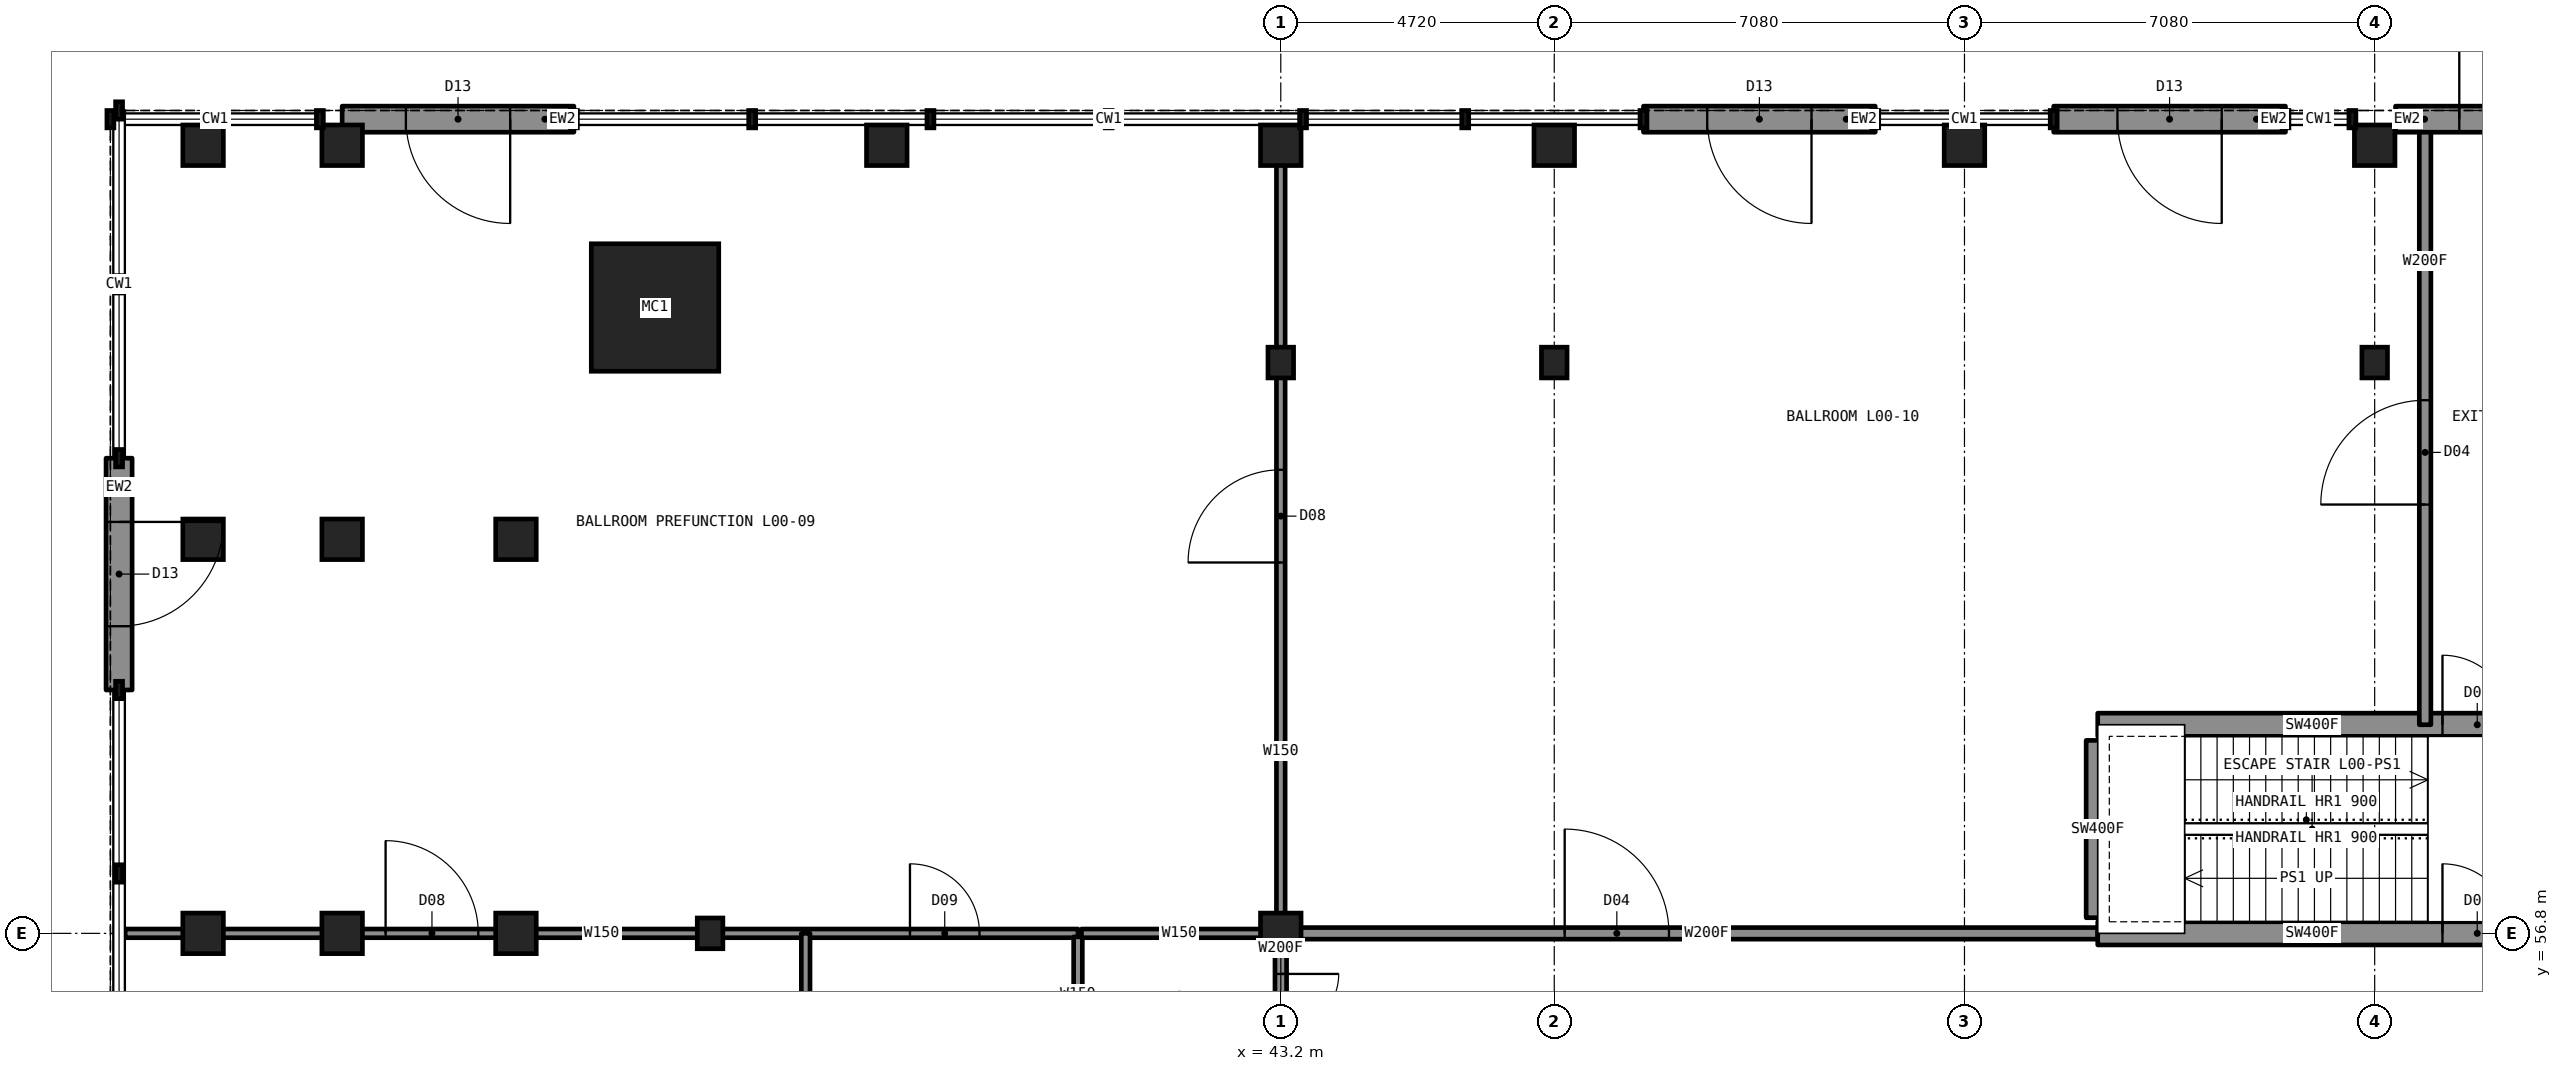
"""IFC4 building model, lengths in metres.
Left out: names, types, materials, properties, quantities, classifications, styles, units other than length and angle.
Written with IfcOpenShell. Run it as: python <this file> out.ifc"""

import sys

from ifc_helpers import new_model, si_unit, direction, frame, frame_2d, origin, origin_2d, place, context, subcontext, project, spatial, rectangle, hollow_rectangle, i_section, extrude, element, fill, save


model = new_model("IFC4")
c1 = context("Model", 3, precision=1e-05, world=origin(), true_north=direction((0.0, 1.0)))
c2 = subcontext(c1, "Body", "Model", "MODEL_VIEW")
j1 = project(units=[si_unit("LENGTHUNIT", "METRE"), si_unit("PLANEANGLEUNIT", "RADIAN")], contexts=[c1])
p1 = place(None, origin())
s1 = spatial("IfcSite", under=j1, at=p1, CompositionType="ELEMENT")
p2 = place(p1, origin())
s2 = spatial("IfcBuilding", under=s1, at=p2, CompositionType="ELEMENT")
p3 = place(p2, origin())
s3 = spatial("IfcBuildingStorey", under=s2, at=p3, CompositionType="ELEMENT", Elevation=0.0)
for number, where, z_axis, x_axis in (
    (1, (33.35, 56.8, 0.0), (0.0, 0.0, 1.0), (1.0, 0.0, 0.0)),
    (2, (43.2, 66.65, 0.0), (0.0, 0.0, 1.0), (1.0, 0.0, 0.0)),
    (3, (47.92, 66.65, 0.0), (0.0, 0.0, 1.0), (1.0, 0.0, 0.0)),
    (4, (62.08, 66.65, 0.0), (0.0, 0.0, 1.0), (1.0, 0.0, 0.0)),
):
    element("IfcColumn", number, at=place(p3, frame(where, z_axis=z_axis, x_axis=x_axis)), inside=s3, PredefinedType="COLUMN", context=c2, shape_type="SweptSolid", body=[
        extrude(i_section(OverallWidth=0.442, OverallDepth=0.531, WebThickness=0.066, FlangeThickness=0.106, at=origin_2d()), origin(), (0.0, 0.0, 1.0), 5.6),
    ])
p4 = place(p3, frame((43.2, 56.8, 0.0), z_axis=(0.0, 0.0, 1.0), x_axis=(1.0, 0.0, 0.0)))
e5 = element("IfcColumn", 5, at=p4, inside=s3, PredefinedType="COLUMN", context=c2, shape_type="SweptSolid", body=[
    extrude(hollow_rectangle(XDim=0.7, YDim=0.7, WallThickness=0.06, at=origin_2d()), origin(), (0.0, 0.0, 1.0), 5.6),
])
p5 = place(p3, frame((32.4, 67.6, 0.0), z_axis=(0.0, 0.0, 1.0), x_axis=(1.0, 0.0, 0.0)))
e6 = element("IfcColumn", 6, at=p5, inside=s3, PredefinedType="COLUMN", context=c2, shape_type="SweptSolid", body=[
    extrude(hollow_rectangle(XDim=2.2, YDim=2.2, WallThickness=0.15, at=origin_2d()), origin(), (0.0, 0.0, 1.0), 5.6),
])
for number, where, z_axis, x_axis in (
    (7, (24.6, 56.8, 0.0), (0.0, 0.0, 1.0), (1.0, 0.0, 0.0)),
    (8, (24.6, 63.6, 0.0), (0.0, 0.0, 1.0), (1.0, 0.0, 0.0)),
    (9, (24.6, 70.4, 0.0), (0.0, 0.0, 1.0), (1.0, 0.0, 0.0)),
    (10, (27.0, 56.8, 0.0), (0.0, 0.0, 1.0), (1.0, 0.0, 0.0)),
    (11, (27.0, 63.6, 0.0), (0.0, 0.0, 1.0), (1.0, 0.0, 0.0)),
    (12, (27.0, 70.4, 0.0), (0.0, 0.0, 1.0), (1.0, 0.0, 0.0)),
    (13, (30.0, 56.8, 0.0), (0.0, 0.0, 1.0), (1.0, 0.0, 0.0)),
    (14, (30.0, 63.6, 0.0), (0.0, 0.0, 1.0), (1.0, 0.0, 0.0)),
    (15, (36.4, 70.4, 0.0), (0.0, 0.0, 1.0), (1.0, 0.0, 0.0)),
    (16, (43.2, 70.4, 0.0), (0.0, 0.0, 1.0), (1.0, 0.0, 0.0)),
    (17, (47.92, 70.4, 0.0), (0.0, 0.0, 1.0), (1.0, 0.0, 0.0)),
    (18, (55.0, 70.4, 0.0), (0.0, 0.0, 1.0), (1.0, 0.0, 0.0)),
    (19, (62.08, 70.4, 0.0), (0.0, 0.0, 1.0), (1.0, 0.0, 0.0)),
):
    element("IfcColumn", number, at=place(p3, frame(where, z_axis=z_axis, x_axis=x_axis)), inside=s3, PredefinedType="COLUMN", context=c2, shape_type="SweptSolid", body=[
        extrude(rectangle(XDim=0.7, YDim=0.7, at=origin_2d()), origin(), (0.0, 0.0, 1.0), 5.6),
    ])
p6 = place(p3, frame((43.2, 56.8, 0.0), z_axis=(0.0, 0.0, 1.0), x_axis=(1.0, 0.0, 0.0)))
e20 = element("IfcWall", 20, at=p6, inside=s3, PredefinedType="PARTITIONING", context=c2, shape_type="SweptSolid", body=[
    extrude(rectangle(XDim=14.1, YDim=0.2, at=frame_2d((7.05, 0.0))), origin(), (0.0, 0.0, 1.0), 5.25),
])
p7 = place(p6, frame((4.9, 0.0, 0.0)))
e21 = element("IfcOpeningElement", 21, at=p7, cuts=e20, PredefinedType="OPENING", context=c2, shape_type="SweptSolid", body=[
    extrude(rectangle(XDim=1.8, YDim=2.2, at=frame_2d((0.9, 1.1))), frame((0.0, 0.11, 0.0), z_axis=(0.0, -1.0, 0.0), x_axis=(1.0, 0.0, 0.0)), (0.0, 0.0, 1.0), 0.22),
])
p8 = place(p3, frame((23.255, 56.8, 0.0), z_axis=(0.0, 0.0, 1.0), x_axis=(1.0, 0.0, 0.0)))
e22 = element("IfcWall", 22, at=p8, inside=s3, PredefinedType="PARTITIONING", context=c2, shape_type="SweptSolid", body=[
    extrude(rectangle(XDim=16.445, YDim=0.15, at=frame_2d((8.223, 0.0))), origin(), (0.0, 0.0, 1.0), 5.25),
])
p9 = place(p8, frame((13.545, 0.0, 0.0)))
e23 = element("IfcOpeningElement", 23, at=p9, cuts=e22, PredefinedType="OPENING", context=c2, shape_type="SweptSolid", body=[
    extrude(rectangle(XDim=1.2, YDim=2.2, at=frame_2d((0.6, 1.1))), frame((0.0, 0.085, 0.0), z_axis=(0.0, -1.0, 0.0), x_axis=(1.0, 0.0, 0.0)), (0.0, 0.0, 1.0), 0.17),
])
p10 = place(p8, frame((4.495, 0.0, 0.0)))
e24 = element("IfcOpeningElement", 24, at=p10, cuts=e22, PredefinedType="OPENING", context=c2, shape_type="SweptSolid", body=[
    extrude(rectangle(XDim=1.6, YDim=2.4, at=frame_2d((0.8, 1.2))), frame((0.0, 0.085, 0.0), z_axis=(0.0, -1.0, 0.0), x_axis=(1.0, 0.0, 0.0)), (0.0, 0.0, 1.0), 0.17),
])
p11 = place(p3, frame((57.3, 56.8, 0.0), z_axis=(0.0, 0.0, 1.0), x_axis=(1.0, 0.0, 0.0)))
e25 = element("IfcWall", 25, at=p11, inside=s3, PredefinedType="SHEAR", context=c2, shape_type="SweptSolid", body=[
    extrude(rectangle(XDim=7.4, YDim=0.4, at=frame_2d((3.7, 0.0))), origin(), (0.0, 0.0, 1.0), 5.6),
])
p12 = place(p11, frame((5.95, 0.0, 0.0)))
e26 = element("IfcOpeningElement", 26, at=p12, cuts=e25, PredefinedType="OPENING", context=c2, shape_type="SweptSolid", body=[
    extrude(rectangle(XDim=1.2, YDim=2.2, at=frame_2d((0.6, 1.1))), frame((0.0, 0.21, 0.0), z_axis=(0.0, -1.0, 0.0), x_axis=(1.0, 0.0, 0.0)), (0.0, 0.0, 1.0), 0.42),
])
p13 = place(p3, frame((57.3, 60.4, 0.0), z_axis=(0.0, 0.0, 1.0), x_axis=(1.0, 0.0, 0.0)))
e27 = element("IfcWall", 27, at=p13, inside=s3, PredefinedType="SHEAR", context=c2, shape_type="SweptSolid", body=[
    extrude(rectangle(XDim=7.4, YDim=0.4, at=frame_2d((3.7, 0.0))), origin(), (0.0, 0.0, 1.0), 5.6),
])
p14 = place(p13, frame((5.95, 0.0, 0.0)))
e28 = element("IfcOpeningElement", 28, at=p14, cuts=e27, PredefinedType="OPENING", context=c2, shape_type="SweptSolid", body=[
    extrude(rectangle(XDim=1.2, YDim=2.2, at=frame_2d((0.6, 1.1))), frame((0.0, 0.21, 0.0), z_axis=(0.0, -1.0, 0.0), x_axis=(1.0, 0.0, 0.0)), (0.0, 0.0, 1.0), 0.42),
])
p15 = place(p3, frame((43.2, 56.8, 0.0), z_axis=(0.0, 0.0, 1.0), x_axis=(0.0, 1.0, 0.0)))
e29 = element("IfcWall", 29, at=p15, inside=s3, PredefinedType="PARTITIONING", context=c2, shape_type="SweptSolid", body=[
    extrude(rectangle(XDim=13.9, YDim=0.15, at=frame_2d((6.95, 0.0))), origin(), (0.0, 0.0, 1.0), 5.25),
])
p16 = place(p15, frame((6.4, 0.0, 0.0)))
e30 = element("IfcOpeningElement", 30, at=p16, cuts=e29, PredefinedType="OPENING", context=c2, shape_type="SweptSolid", body=[
    extrude(rectangle(XDim=1.6, YDim=2.4, at=frame_2d((0.8, 1.2))), frame((0.0, 0.085, 0.0), z_axis=(0.0, -1.0, 0.0), x_axis=(1.0, 0.0, 0.0)), (0.0, 0.0, 1.0), 0.17),
])
p17 = place(p3, frame((35.0, 33.2, 0.0), z_axis=(0.0, 0.0, 1.0), x_axis=(0.0, 1.0, 0.0)))
e31 = element("IfcWall", 31, at=p17, inside=s3, PredefinedType="PARTITIONING", context=c2, shape_type="SweptSolid", body=[
    extrude(rectangle(XDim=23.6, YDim=0.15, at=frame_2d((11.8, 0.0))), origin(), (0.0, 0.0, 1.0), 5.25),
])
p18 = place(p3, frame((57.3, 57.07, 0.0), z_axis=(0.0, 0.0, 1.0), x_axis=(0.0, 1.0, 0.0)))
e32 = element("IfcWall", 32, at=p18, inside=s3, PredefinedType="SHEAR", context=c2, shape_type="SweptSolid", body=[
    extrude(rectangle(XDim=3.06, YDim=0.4, at=frame_2d((1.53, 0.0))), origin(), (0.0, 0.0, 1.0), 5.6),
])
p19 = place(p3, frame((62.95, 60.4, 0.0), z_axis=(0.0, 0.0, 1.0), x_axis=(0.0, 1.0, 0.0)))
e33 = element("IfcWall", 33, at=p19, inside=s3, PredefinedType="PARTITIONING", context=c2, shape_type="SweptSolid", body=[
    extrude(rectangle(XDim=10.3, YDim=0.2, at=frame_2d((5.15, 0.0))), origin(), (0.0, 0.0, 1.0), 5.25),
])
p20 = place(p19, frame((3.8, 0.0, 0.0)))
e34 = element("IfcOpeningElement", 34, at=p20, cuts=e33, PredefinedType="OPENING", context=c2, shape_type="SweptSolid", body=[
    extrude(rectangle(XDim=1.8, YDim=2.2, at=frame_2d((0.9, 1.1))), frame((0.0, 0.11, 0.0), z_axis=(0.0, -1.0, 0.0), x_axis=(1.0, 0.0, 0.0)), (0.0, 0.0, 1.0), 0.22),
])
p21 = place(p3, frame((43.2, 56.74, 0.0), z_axis=(0.0, 0.0, 1.0), x_axis=(0.0, -1.0, 0.0)))
e35 = element("IfcWall", 35, at=p21, inside=s3, PredefinedType="PARTITIONING", context=c2, shape_type="SweptSolid", body=[
    extrude(rectangle(XDim=1.98, YDim=0.2, at=frame_2d((0.99, 0.0))), origin(), (0.0, 0.0, 1.0), 5.25),
])
p22 = place(p21, frame((0.64, 0.0, 0.0)))
e36 = element("IfcOpeningElement", 36, at=p22, cuts=e35, PredefinedType="OPENING", context=c2, shape_type="SweptSolid", body=[
    extrude(rectangle(XDim=1.0, YDim=2.1, at=frame_2d((0.5, 1.05))), frame((0.0, 0.11, 0.0), z_axis=(0.0, -1.0, 0.0), x_axis=(1.0, 0.0, 0.0)), (0.0, 0.0, 1.0), 0.22),
])
p23 = place(p3, frame((39.7, 54.76, 0.0), z_axis=(0.0, 0.0, 1.0), x_axis=(0.0, 1.0, 0.0)))
e37 = element("IfcWall", 37, at=p23, inside=s3, PredefinedType="PARTITIONING", context=c2, shape_type="SweptSolid", body=[
    extrude(rectangle(XDim=1.98, YDim=0.15, at=frame_2d((0.99, 0.0))), origin(), (0.0, 0.0, 1.0), 5.25),
])
p24 = place(p3, frame((39.76, 56.8, 0.0), z_axis=(0.0, 0.0, 1.0), x_axis=(1.0, 0.0, 0.0)))
e38 = element("IfcWall", 38, at=p24, inside=s3, PredefinedType="PARTITIONING", context=c2, shape_type="SweptSolid", body=[
    extrude(rectangle(XDim=3.38, YDim=0.15, at=frame_2d((1.69, 0.0))), origin(), (0.0, 0.0, 1.0), 5.25),
])
p25 = place(p3, frame((62.44, 70.85, 0.0), z_axis=(0.0, 0.0, 1.0), x_axis=(1.0, 0.0, 0.0)))
e39 = element("IfcWall", 39, at=p25, inside=s3, PredefinedType="SOLIDWALL", context=c2, shape_type="SweptSolid", body=[
    extrude(rectangle(XDim=4.0, YDim=0.45, at=frame_2d((2.0, 0.0))), origin(), (0.0, 0.0, 1.0), 5.25),
])
p26 = place(p25, frame((1.1, 0.0, 0.0)))
e40 = element("IfcOpeningElement", 40, at=p26, cuts=e39, PredefinedType="OPENING", context=c2, shape_type="SweptSolid", body=[
    extrude(rectangle(XDim=1.8, YDim=2.4, at=frame_2d((0.9, 1.2))), frame((0.0, 0.235, 0.0), z_axis=(0.0, -1.0, 0.0), x_axis=(1.0, 0.0, 0.0)), (0.0, 0.0, 1.0), 0.47),
])
p27 = place(p3, frame((60.54, 70.85, 0.0), z_axis=(0.0, 0.0, 1.0), x_axis=(-1.0, 0.0, 0.0)))
e41 = element("IfcWall", 41, at=p27, inside=s3, PredefinedType="SOLIDWALL", context=c2, shape_type="SweptSolid", body=[
    extrude(rectangle(XDim=4.0, YDim=0.45, at=frame_2d((2.0, 0.0))), origin(), (0.0, 0.0, 1.0), 5.25),
])
p28 = place(p27, frame((1.1, 0.0, 0.0)))
e42 = element("IfcOpeningElement", 42, at=p28, cuts=e41, PredefinedType="OPENING", context=c2, shape_type="SweptSolid", body=[
    extrude(rectangle(XDim=1.8, YDim=2.4, at=frame_2d((0.9, 1.2))), frame((0.0, 0.235, 0.0), z_axis=(0.0, -1.0, 0.0), x_axis=(1.0, 0.0, 0.0)), (0.0, 0.0, 1.0), 0.47),
])
p29 = place(p3, frame((53.46, 70.85, 0.0), z_axis=(0.0, 0.0, 1.0), x_axis=(-1.0, 0.0, 0.0)))
e43 = element("IfcWall", 43, at=p29, inside=s3, PredefinedType="SOLIDWALL", context=c2, shape_type="SweptSolid", body=[
    extrude(rectangle(XDim=4.0, YDim=0.45, at=frame_2d((2.0, 0.0))), origin(), (0.0, 0.0, 1.0), 5.25),
])
p30 = place(p29, frame((1.1, 0.0, 0.0)))
e44 = element("IfcOpeningElement", 44, at=p30, cuts=e43, PredefinedType="OPENING", context=c2, shape_type="SweptSolid", body=[
    extrude(rectangle(XDim=1.8, YDim=2.4, at=frame_2d((0.9, 1.2))), frame((0.0, 0.235, 0.0), z_axis=(0.0, -1.0, 0.0), x_axis=(1.0, 0.0, 0.0)), (0.0, 0.0, 1.0), 0.47),
])
p31 = place(p3, frame((31.0, 70.85, 0.0), z_axis=(0.0, 0.0, 1.0), x_axis=(-1.0, 0.0, 0.0)))
e45 = element("IfcWall", 45, at=p31, inside=s3, PredefinedType="SOLIDWALL", context=c2, shape_type="SweptSolid", body=[
    extrude(rectangle(XDim=4.0, YDim=0.45, at=frame_2d((2.0, 0.0))), origin(), (0.0, 0.0, 1.0), 5.25),
])
p32 = place(p31, frame((1.1, 0.0, 0.0)))
e46 = element("IfcOpeningElement", 46, at=p32, cuts=e45, PredefinedType="OPENING", context=c2, shape_type="SweptSolid", body=[
    extrude(rectangle(XDim=1.8, YDim=2.4, at=frame_2d((0.9, 1.2))), frame((0.0, 0.235, 0.0), z_axis=(0.0, -1.0, 0.0), x_axis=(1.0, 0.0, 0.0)), (0.0, 0.0, 1.0), 0.47),
])
p33 = place(p3, frame((23.15, 65.0, 0.0), z_axis=(0.0, 0.0, 1.0), x_axis=(0.0, -1.0, 0.0)))
e47 = element("IfcWall", 47, at=p33, inside=s3, PredefinedType="SOLIDWALL", context=c2, shape_type="SweptSolid", body=[
    extrude(rectangle(XDim=4.0, YDim=0.45, at=frame_2d((2.0, 0.0))), origin(), (0.0, 0.0, 1.0), 5.25),
])
p34 = place(p33, frame((1.1, 0.0, 0.0)))
e48 = element("IfcOpeningElement", 48, at=p34, cuts=e47, PredefinedType="OPENING", context=c2, shape_type="SweptSolid", body=[
    extrude(rectangle(XDim=1.8, YDim=2.4, at=frame_2d((0.9, 1.2))), frame((0.0, 0.235, 0.0), z_axis=(0.0, -1.0, 0.0), x_axis=(1.0, 0.0, 0.0)), (0.0, 0.0, 1.0), 0.47),
])
p35 = place(p12, origin())
e49 = element("IfcDoor", 49, at=p35, inside=s3, OperationType="SINGLE_SWING_LEFT", PredefinedType="DOOR", context=c2, shape_type="SweptSolid", body=[
    extrude(rectangle(XDim=1.2, YDim=2.2, at=frame_2d((0.6, 1.1))), frame((0.0, 0.025, 0.0), z_axis=(0.0, -1.0, 0.0), x_axis=(1.0, 0.0, 0.0)), (0.0, 0.0, 1.0), 0.05),
])
fill(e26, e49)
p36 = place(p14, origin())
e50 = element("IfcDoor", 50, at=p36, inside=s3, OperationType="SINGLE_SWING_LEFT", PredefinedType="DOOR", context=c2, shape_type="SweptSolid", body=[
    extrude(rectangle(XDim=1.2, YDim=2.2, at=frame_2d((0.6, 1.1))), frame((0.0, 0.025, 0.0), z_axis=(0.0, -1.0, 0.0), x_axis=(1.0, 0.0, 0.0)), (0.0, 0.0, 1.0), 0.05),
])
fill(e28, e50)
p37 = place(p9, origin())
e51 = element("IfcDoor", 51, at=p37, inside=s3, OperationType="SINGLE_SWING_LEFT", PredefinedType="DOOR", context=c2, shape_type="SweptSolid", body=[
    extrude(rectangle(XDim=1.2, YDim=2.2, at=frame_2d((0.6, 1.1))), frame((0.0, 0.025, 0.0), z_axis=(0.0, -1.0, 0.0), x_axis=(1.0, 0.0, 0.0)), (0.0, 0.0, 1.0), 0.05),
])
fill(e23, e51)
p38 = place(p16, origin())
e52 = element("IfcDoor", 52, at=p38, inside=s3, OperationType="DOUBLE_DOOR_SINGLE_SWING", PredefinedType="DOOR", context=c2, shape_type="SweptSolid", body=[
    extrude(rectangle(XDim=1.6, YDim=2.4, at=frame_2d((0.8, 1.2))), frame((0.0, 0.025, 0.0), z_axis=(0.0, -1.0, 0.0), x_axis=(1.0, 0.0, 0.0)), (0.0, 0.0, 1.0), 0.05),
])
fill(e30, e52)
p39 = place(p10, origin())
e53 = element("IfcDoor", 53, at=p39, inside=s3, OperationType="DOUBLE_DOOR_SINGLE_SWING", PredefinedType="DOOR", context=c2, shape_type="SweptSolid", body=[
    extrude(rectangle(XDim=1.6, YDim=2.4, at=frame_2d((0.8, 1.2))), frame((0.0, 0.025, 0.0), z_axis=(0.0, -1.0, 0.0), x_axis=(1.0, 0.0, 0.0)), (0.0, 0.0, 1.0), 0.05),
])
fill(e24, e53)
p40 = place(p7, origin())
e54 = element("IfcDoor", 54, at=p40, inside=s3, OperationType="DOUBLE_DOOR_SINGLE_SWING", PredefinedType="DOOR", context=c2, shape_type="SweptSolid", body=[
    extrude(rectangle(XDim=1.8, YDim=2.2, at=frame_2d((0.9, 1.1))), frame((0.0, 0.025, 0.0), z_axis=(0.0, -1.0, 0.0), x_axis=(1.0, 0.0, 0.0)), (0.0, 0.0, 1.0), 0.05),
])
fill(e21, e54)
p41 = place(p22, origin())
e55 = element("IfcDoor", 55, at=p41, inside=s3, OperationType="SINGLE_SWING_LEFT", PredefinedType="DOOR", context=c2, shape_type="SweptSolid", body=[
    extrude(rectangle(XDim=1.0, YDim=2.1, at=frame_2d((0.5, 1.05))), frame((0.0, 0.025, 0.0), z_axis=(0.0, -1.0, 0.0), x_axis=(1.0, 0.0, 0.0)), (0.0, 0.0, 1.0), 0.05),
])
fill(e36, e55)
p42 = place(p20, origin())
e56 = element("IfcDoor", 56, at=p42, inside=s3, OperationType="DOUBLE_DOOR_SINGLE_SWING", PredefinedType="DOOR", context=c2, shape_type="SweptSolid", body=[
    extrude(rectangle(XDim=1.8, YDim=2.2, at=frame_2d((0.9, 1.1))), frame((0.0, 0.025, 0.0), z_axis=(0.0, -1.0, 0.0), x_axis=(1.0, 0.0, 0.0)), (0.0, 0.0, 1.0), 0.05),
])
fill(e34, e56)
p43 = place(p26, origin())
e57 = element("IfcDoor", 57, at=p43, inside=s3, OperationType="DOUBLE_DOOR_SINGLE_SWING", PredefinedType="DOOR", context=c2, shape_type="SweptSolid", body=[
    extrude(rectangle(XDim=1.8, YDim=2.4, at=frame_2d((0.9, 1.2))), frame((0.0, 0.025, 0.0), z_axis=(0.0, -1.0, 0.0), x_axis=(1.0, 0.0, 0.0)), (0.0, 0.0, 1.0), 0.05),
])
fill(e40, e57)
p44 = place(p28, origin())
e58 = element("IfcDoor", 58, at=p44, inside=s3, OperationType="DOUBLE_DOOR_SINGLE_SWING", PredefinedType="DOOR", context=c2, shape_type="SweptSolid", body=[
    extrude(rectangle(XDim=1.8, YDim=2.4, at=frame_2d((0.9, 1.2))), frame((0.0, 0.025, 0.0), z_axis=(0.0, -1.0, 0.0), x_axis=(1.0, 0.0, 0.0)), (0.0, 0.0, 1.0), 0.05),
])
fill(e42, e58)
p45 = place(p30, origin())
e59 = element("IfcDoor", 59, at=p45, inside=s3, OperationType="DOUBLE_DOOR_SINGLE_SWING", PredefinedType="DOOR", context=c2, shape_type="SweptSolid", body=[
    extrude(rectangle(XDim=1.8, YDim=2.4, at=frame_2d((0.9, 1.2))), frame((0.0, 0.025, 0.0), z_axis=(0.0, -1.0, 0.0), x_axis=(1.0, 0.0, 0.0)), (0.0, 0.0, 1.0), 0.05),
])
fill(e44, e59)
p46 = place(p32, origin())
e60 = element("IfcDoor", 60, at=p46, inside=s3, OperationType="DOUBLE_DOOR_SINGLE_SWING", PredefinedType="DOOR", context=c2, shape_type="SweptSolid", body=[
    extrude(rectangle(XDim=1.8, YDim=2.4, at=frame_2d((0.9, 1.2))), frame((0.0, 0.025, 0.0), z_axis=(0.0, -1.0, 0.0), x_axis=(1.0, 0.0, 0.0)), (0.0, 0.0, 1.0), 0.05),
])
fill(e46, e60)
p47 = place(p34, origin())
e61 = element("IfcDoor", 61, at=p47, inside=s3, OperationType="DOUBLE_DOOR_SINGLE_SWING", PredefinedType="DOOR", context=c2, shape_type="SweptSolid", body=[
    extrude(rectangle(XDim=1.8, YDim=2.4, at=frame_2d((0.9, 1.2))), frame((0.0, 0.025, 0.0), z_axis=(0.0, -1.0, 0.0), x_axis=(1.0, 0.0, 0.0)), (0.0, 0.0, 1.0), 0.05),
])
fill(e48, e61)
save(model, sys.argv[1])
